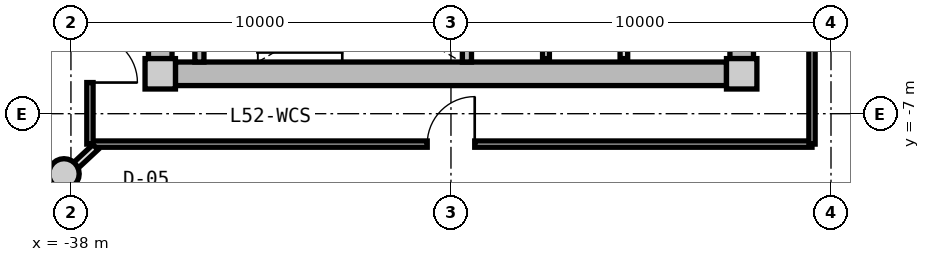
"""IFC4 building model, lengths in metres.
Left out: names, types, materials, properties, quantities, classifications, styles, units other than length and angle.
Written with IfcOpenShell. Run it as: python <this file> out.ifc"""

import sys

from ifc_helpers import new_model, si_unit, direction, frame, frame_2d, origin, origin_2d, place, context, subcontext, project, spatial, rectangle, circle, extrude, source, transform, mapped, element, fill, save


model = new_model("IFC4")
c1 = context("Model", 3, precision=1e-05, world=origin(), true_north=direction((0.0, 1.0)))
c2 = subcontext(c1, "Body", "Model", "MODEL_VIEW")
j1 = project(units=[si_unit("LENGTHUNIT", "METRE"), si_unit("PLANEANGLEUNIT", "RADIAN")], contexts=[c1])
p1 = place(None, origin())
s1 = spatial("IfcSite", under=j1, at=p1, CompositionType="ELEMENT")
p2 = place(p1, origin())
s2 = spatial("IfcBuilding", under=s1, at=p2, CompositionType="ELEMENT")
p3 = place(p2, frame((0.0, 0.0, 167.85)))
s3 = spatial("IfcBuildingStorey", under=s2, at=p3, CompositionType="ELEMENT", Elevation=167.85)
m1 = source(origin(), c2, "Body", "SweptSolid", [
    extrude(rectangle(XDim=0.8, YDim=0.8, at=origin_2d()), origin(), (0.0, 0.0, 1.0), 3.05),
])
for number, where, z_axis, x_axis in (
    (1, (-35.65, -5.95, 0.0), (0.0, 0.0, 1.0), (1.0, 0.0, 0.0)),
    (2, (-20.35, -5.95, 0.0), (0.0, 0.0, 1.0), (1.0, 0.0, 0.0)),
):
    element("IfcColumn", number, at=place(p3, frame(where, z_axis=z_axis, x_axis=x_axis)), inside=s3, PredefinedType="COLUMN", context=c2, shape_type="MappedRepresentation", body=[
        mapped(m1, transform((0.0, 0.0, 0.0), x_axis=(1.0, 0.0, 0.0), y_axis=(0.0, 1.0, 0.0), z_axis=(0.0, 0.0, 1.0), scale=1.0)),
    ])
m2 = source(origin(), c2, "Body", "SweptSolid", [
    extrude(rectangle(XDim=14.5, YDim=0.62, at=frame_2d((7.25, 0.0))), origin(), (0.0, 0.0, 1.0), 2.81),
])
p4 = place(p3, frame((-20.75, -5.95, 0.0), z_axis=(0.0, 0.0, 1.0), x_axis=(-1.0, 0.0, 0.0)))
e3 = element("IfcWall", 3, at=p4, inside=s3, PredefinedType="SHEAR", context=c2, shape_type="MappedRepresentation", body=[
    mapped(m2, transform((0.0, 0.0, 0.0), x_axis=(1.0, 0.0, 0.0), y_axis=(0.0, 1.0, 0.0), z_axis=(0.0, 0.0, 1.0), scale=1.0)),
])
m3 = source(origin(), c2, "Body", "SweptSolid", [
    extrude(rectangle(XDim=11.1, YDim=0.62, at=frame_2d((5.55, 0.0))), origin(), (0.0, 0.0, 1.0), 2.81),
])
p5 = place(p3, frame((-35.65, -5.55, 0.0), z_axis=(0.0, 0.0, 1.0), x_axis=(0.0, 1.0, 0.0)))
e4 = element("IfcWall", 4, at=p5, inside=s3, PredefinedType="SHEAR", context=c2, shape_type="MappedRepresentation", body=[
    mapped(m3, transform((0.0, 0.0, 0.0), x_axis=(1.0, 0.0, 0.0), y_axis=(0.0, 1.0, 0.0), z_axis=(0.0, 0.0, 1.0), scale=1.0)),
])
p6 = place(p5, frame((3.8, 0.0, 0.0)))
e5 = element("IfcOpeningElement", 5, at=p6, cuts=e4, PredefinedType="OPENING", context=c2, shape_type="SweptSolid", body=[
    extrude(rectangle(XDim=1.2, YDim=2.15, at=frame_2d((0.6, 1.075))), frame((0.0, 0.32, 0.0), z_axis=(0.0, -1.0, 0.0), x_axis=(1.0, 0.0, 0.0)), (0.0, 0.0, 1.0), 0.64),
])
p7 = place(p3, frame((-20.35, 5.55, 0.0), z_axis=(0.0, 0.0, 1.0), x_axis=(0.0, -1.0, 0.0)))
e6 = element("IfcWall", 6, at=p7, inside=s3, PredefinedType="SHEAR", context=c2, shape_type="MappedRepresentation", body=[
    mapped(m3, transform((0.0, 0.0, 0.0), x_axis=(1.0, 0.0, 0.0), y_axis=(0.0, 1.0, 0.0), z_axis=(0.0, 0.0, 1.0), scale=1.0)),
])
p8 = place(p7, frame((5.65, 0.0, 0.0)))
e7 = element("IfcOpeningElement", 7, at=p8, cuts=e6, PredefinedType="OPENING", context=c2, shape_type="SweptSolid", body=[
    extrude(rectangle(XDim=1.2, YDim=2.15, at=frame_2d((0.6, 1.075))), frame((0.0, 0.32, 0.0), z_axis=(0.0, -1.0, 0.0), x_axis=(1.0, 0.0, 0.0)), (0.0, 0.0, 1.0), 0.64),
])
p9 = place(p7, frame((9.3, 0.0, 0.0)))
e8 = element("IfcOpeningElement", 8, at=p9, cuts=e6, PredefinedType="OPENING", context=c2, shape_type="SweptSolid", body=[
    extrude(rectangle(XDim=1.0, YDim=2.1, at=frame_2d((0.5, 1.05))), frame((0.0, 0.32, 0.0), z_axis=(0.0, -1.0, 0.0), x_axis=(1.0, 0.0, 0.0)), (0.0, 0.0, 1.0), 0.64),
])
m4 = source(origin(), c2, "Body", "SweptSolid", [
    extrude(circle(Radius=0.4, at=origin_2d()), origin(), (0.0, 0.0, 1.0), 3.05),
])
p10 = place(p3, frame((-38.183, -8.584, 0.0), z_axis=(0.0, 0.0, 1.0), x_axis=(1.0, 0.0, 0.0)))
e9 = element("IfcColumn", 9, at=p10, inside=s3, PredefinedType="COLUMN", context=c2, shape_type="MappedRepresentation", body=[
    mapped(m4, transform((0.0, 0.0, 0.0), x_axis=(1.0, 0.0, 0.0), y_axis=(0.0, 1.0, 0.0), z_axis=(0.0, 0.0, 1.0), scale=1.0)),
])
m5 = source(origin(), c2, "Body", "SweptSolid", [
    extrude(rectangle(XDim=3.19, YDim=0.24, at=frame_2d((1.595, 0.0))), origin(), (0.0, 0.0, 1.0), 2.81),
])
for number, where, z_axis, x_axis in (
    (10, (-34.62, -5.64, 0.0), (0.0, 0.0, 1.0), (0.0, 1.0, 0.0)),
    (11, (-27.58, -5.64, 0.0), (0.0, 0.0, 1.0), (0.0, 1.0, 0.0)),
):
    element("IfcWall", number, at=place(p3, frame(where, z_axis=z_axis, x_axis=x_axis)), inside=s3, PredefinedType="PARTITIONING", context=c2, shape_type="MappedRepresentation", body=[
        mapped(m5, transform((0.0, 0.0, 0.0), x_axis=(1.0, 0.0, 0.0), y_axis=(0.0, 1.0, 0.0), z_axis=(0.0, 0.0, 1.0), scale=1.0)),
    ])
m6 = source(origin(), c2, "Body", "SweptSolid", [
    extrude(rectangle(XDim=3.8, YDim=0.2, at=frame_2d((1.9, 0.0))), origin(), (0.0, 0.0, 1.0), 2.795),
])
p11 = place(p3, frame((-23.45, -5.55, 0.0), z_axis=(0.0, 0.0, 1.0), x_axis=(0.0, 1.0, 0.0)))
e12 = element("IfcWall", 12, at=p11, inside=s3, PredefinedType="PARTITIONING", context=c2, shape_type="MappedRepresentation", body=[
    mapped(m6, transform((0.0, 0.0, 0.0), x_axis=(1.0, 0.0, 0.0), y_axis=(0.0, 1.0, 0.0), z_axis=(0.0, 0.0, 1.0), scale=1.0)),
])
m7 = source(origin(), c2, "Body", "SweptSolid", [
    extrude(rectangle(XDim=4.2, YDim=0.18, at=frame_2d((2.1, 0.0))), origin(), (0.0, 0.0, 1.0), 2.795),
])
p12 = place(p3, frame((-25.5, -5.55, 0.0), z_axis=(0.0, 0.0, 1.0), x_axis=(0.0, 1.0, 0.0)))
e13 = element("IfcWall", 13, at=p12, inside=s3, PredefinedType="PARTITIONING", context=c2, shape_type="MappedRepresentation", body=[
    mapped(m7, transform((0.0, 0.0, 0.0), x_axis=(1.0, 0.0, 0.0), y_axis=(0.0, 1.0, 0.0), z_axis=(0.0, 0.0, 1.0), scale=1.0)),
])
m8 = source(origin(), c2, "Body", "SweptSolid", [
    extrude(rectangle(XDim=19.0, YDim=0.165, at=frame_2d((9.5, 0.0))), origin(), (0.0, 0.0, 1.0), 2.795),
])
p13 = place(p3, frame((-18.5, -7.8, 0.0), z_axis=(0.0, 0.0, 1.0), x_axis=(-1.0, 0.0, 0.0)))
e14 = element("IfcWall", 14, at=p13, inside=s3, PredefinedType="PARTITIONING", context=c2, shape_type="MappedRepresentation", body=[
    mapped(m8, transform((0.0, 0.0, 0.0), x_axis=(1.0, 0.0, 0.0), y_axis=(0.0, 1.0, 0.0), z_axis=(0.0, 0.0, 1.0), scale=1.0)),
])
p14 = place(p13, frame((8.875, 0.0, 0.0)))
e15 = element("IfcOpeningElement", 15, at=p14, cuts=e14, PredefinedType="OPENING", context=c2, shape_type="SweptSolid", body=[
    extrude(rectangle(XDim=1.25, YDim=2.2, at=frame_2d((0.625, 1.1))), frame((0.0, 0.093, 0.0), z_axis=(0.0, -1.0, 0.0), x_axis=(1.0, 0.0, 0.0)), (0.0, 0.0, 1.0), 0.185),
])
m9 = source(origin(), c2, "Body", "SweptSolid", [
    extrude(rectangle(XDim=6.88, YDim=0.165, at=frame_2d((3.44, 0.0))), origin(), (0.0, 0.0, 1.0), 2.795),
])
p15 = place(p3, frame((-37.5, -7.8, 0.0), z_axis=(0.0, 0.0, 1.0), x_axis=(0.0, 1.0, 0.0)))
e16 = element("IfcWall", 16, at=p15, inside=s3, PredefinedType="PARTITIONING", context=c2, shape_type="MappedRepresentation", body=[
    mapped(m9, transform((0.0, 0.0, 0.0), x_axis=(1.0, 0.0, 0.0), y_axis=(0.0, 1.0, 0.0), z_axis=(0.0, 0.0, 1.0), scale=1.0)),
])
p16 = place(p15, frame((1.62, 0.0, 0.0)))
e17 = element("IfcOpeningElement", 17, at=p16, cuts=e16, PredefinedType="OPENING", context=c2, shape_type="SweptSolid", body=[
    extrude(rectangle(XDim=1.25, YDim=2.2, at=frame_2d((0.625, 1.1))), frame((0.0, 0.093, 0.0), z_axis=(0.0, -1.0, 0.0), x_axis=(1.0, 0.0, 0.0)), (0.0, 0.0, 1.0), 0.185),
])
m10 = source(origin(), c2, "Body", "SweptSolid", [
    extrude(rectangle(XDim=7.365, YDim=0.165, at=frame_2d((3.682, 0.0))), origin(), (0.0, 0.0, 1.0), 2.795),
])
p17 = place(p3, frame((-18.5, -0.436, 0.0), z_axis=(0.0, 0.0, 1.0), x_axis=(0.0, -1.0, 0.0)))
e18 = element("IfcWall", 18, at=p17, inside=s3, PredefinedType="PARTITIONING", context=c2, shape_type="MappedRepresentation", body=[
    mapped(m10, transform((0.0, 0.0, 0.0), x_axis=(1.0, 0.0, 0.0), y_axis=(0.0, 1.0, 0.0), z_axis=(0.0, 0.0, 1.0), scale=1.0)),
])
m11 = source(origin(), c2, "Body", "SweptSolid", [
    extrude(rectangle(XDim=2.435, YDim=0.19, at=frame_2d((1.217, 0.0))), origin(), (0.0, 0.0, 1.0), 2.345),
])
p18 = place(p3, frame((-37.354, -7.88, 0.0), z_axis=(0.0, 0.0, 1.0), x_axis=(-0.732164643118, -0.681127693878, 0.0)))
e19 = element("IfcWall", 19, at=p18, inside=s3, PredefinedType="PARTITIONING", context=c2, shape_type="MappedRepresentation", body=[
    mapped(m11, transform((0.0, 0.0, 0.0), x_axis=(1.0, 0.0, 0.0), y_axis=(0.0, 1.0, 0.0), z_axis=(0.0, 0.0, 1.0), scale=1.0)),
])
m12 = source(origin(), c2, "Body", "SweptSolid", [
    extrude(rectangle(XDim=1.25, YDim=2.2, at=frame_2d((0.625, 1.1))), frame((0.0, 0.025, 0.0), z_axis=(0.0, -1.0, 0.0), x_axis=(1.0, 0.0, 0.0)), (0.0, 0.0, 1.0), 0.05),
])
p19 = place(p16, frame((1.25, 0.0, 0.0), z_axis=(0.0, 0.0, 1.0), x_axis=(-1.0, 0.0, 0.0)))
e20 = element("IfcDoor", 20, at=p19, inside=s3, OperationType="SINGLE_SWING_RIGHT", PredefinedType="DOOR", context=c2, shape_type="MappedRepresentation", body=[
    mapped(m12, transform((0.0, 0.0, 0.0), x_axis=(1.0, 0.0, 0.0), y_axis=(0.0, 1.0, 0.0), z_axis=(0.0, 0.0, 1.0), scale=1.0)),
])
fill(e17, e20)
p20 = place(p14, frame((1.25, 0.0, 0.0), z_axis=(0.0, 0.0, 1.0), x_axis=(-1.0, 0.0, 0.0)))
e21 = element("IfcDoor", 21, at=p20, inside=s3, OperationType="SINGLE_SWING_RIGHT", PredefinedType="DOOR", context=c2, shape_type="MappedRepresentation", body=[
    mapped(m12, transform((0.0, 0.0, 0.0), x_axis=(1.0, 0.0, 0.0), y_axis=(0.0, 1.0, 0.0), z_axis=(0.0, 0.0, 1.0), scale=1.0)),
])
fill(e15, e21)
save(model, sys.argv[1])
